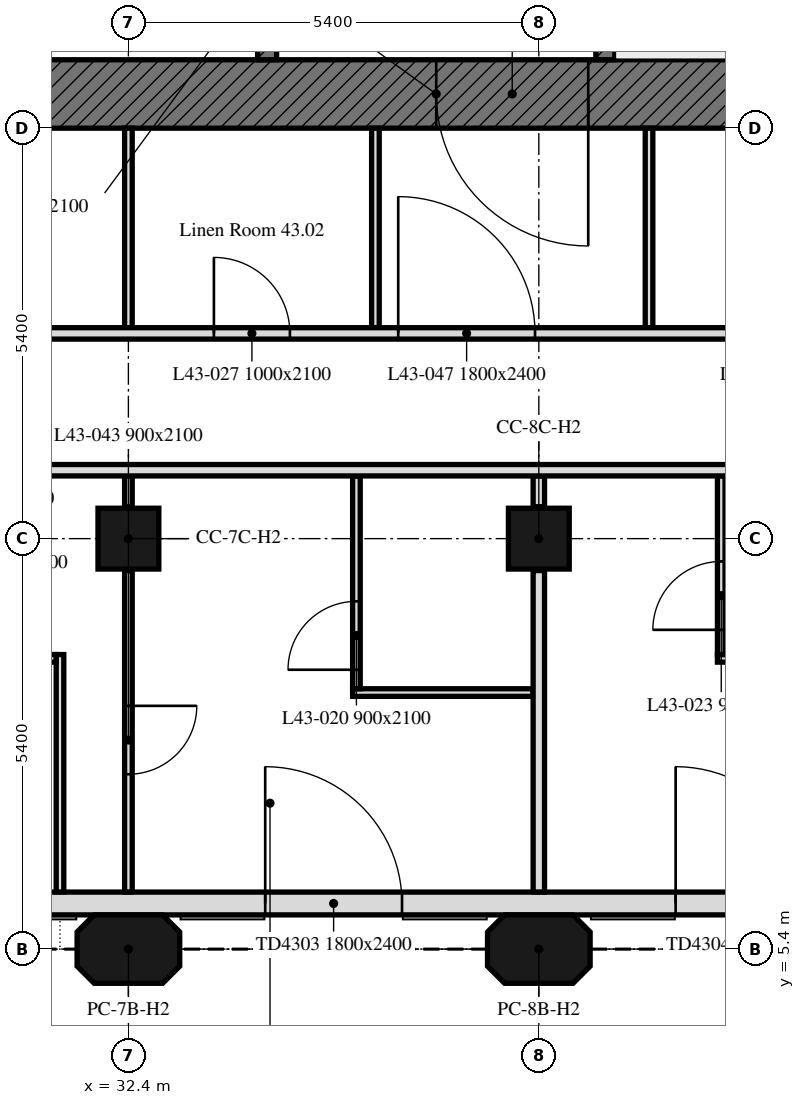
"""IFC4 building model, lengths in metres.
Left out: names, types, materials, properties, quantities, classifications, styles, units other than length and angle.
Written with IfcOpenShell. Run it as: python <this file> out.ifc"""

import sys

from ifc_helpers import new_model, si_unit, direction, frame, frame_2d, origin, origin_2d, place, context, subcontext, project, spatial, polyline, rectangle, outline, extrude, element, fill, save


model = new_model("IFC4")
c1 = context("Model", 3, precision=1e-05, world=origin(), true_north=direction((0.0, 1.0)))
c2 = subcontext(c1, "Body", "Model", "MODEL_VIEW")
j1 = project(units=[si_unit("LENGTHUNIT", "METRE"), si_unit("PLANEANGLEUNIT", "RADIAN")], contexts=[c1])
p1 = place(None, origin())
s1 = spatial("IfcSite", under=j1, at=p1, CompositionType="ELEMENT")
p2 = place(p1, origin())
s2 = spatial("IfcBuilding", under=s1, at=p2, CompositionType="ELEMENT")
p3 = place(p2, frame((0.0, 0.0, 180.7)))
s3 = spatial("IfcBuildingStorey", under=s2, at=p3, CompositionType="ELEMENT", Elevation=180.7)
for number, where, z_axis, x_axis in (
    (1, (32.4, 5.4, 0.0), (0.0, 0.0, 1.0), (1.0, 0.0, 0.0)),
    (2, (37.8, 5.4, 0.0), (0.0, 0.0, 1.0), (1.0, 0.0, 0.0)),
):
    element("IfcColumn", number, at=place(p3, frame(where, z_axis=z_axis, x_axis=x_axis)), inside=s3, PredefinedType="COLUMN", context=c2, shape_type="SweptSolid", body=[
        extrude(outline(polyline([(-0.45, -0.45), (0.45, -0.45), (0.675, -0.225), (0.675, 0.225), (0.45, 0.45), (-0.45, 0.45), (-0.675, 0.225), (-0.675, -0.225), (-0.45, -0.45)])), origin(), (0.0, 0.0, 1.0), 3.0),
    ])
for number, where, z_axis, x_axis in (
    (3, (32.4, 10.8, 0.0), (0.0, 0.0, 1.0), (1.0, 0.0, 0.0)),
    (4, (37.8, 10.8, 0.0), (0.0, 0.0, 1.0), (1.0, 0.0, 0.0)),
):
    element("IfcColumn", number, at=place(p3, frame(where, z_axis=z_axis, x_axis=x_axis)), inside=s3, PredefinedType="COLUMN", context=c2, shape_type="SweptSolid", body=[
        extrude(rectangle(XDim=0.8, YDim=0.8, at=origin_2d()), origin(), (0.0, 0.0, 1.0), 3.0),
    ])
p4 = place(p3, frame((10.986, 6.0, 0.0), z_axis=(0.0, 0.0, 1.0), x_axis=(1.0, 0.0, 0.0)))
e5 = element("IfcWall", 5, at=p4, inside=s3, PredefinedType="SOLIDWALL", context=c2, shape_type="SweptSolid", body=[
    extrude(rectangle(XDim=32.027, YDim=0.3, at=frame_2d((16.014, 0.0))), origin(), (0.0, 0.0, 1.0), 3.0),
])
p5 = place(p4, frame((1.614, 0.0, 0.0)))
e6 = element("IfcOpeningElement", 6, at=p5, cuts=e5, PredefinedType="OPENING", context=c2, shape_type="SweptSolid", body=[
    extrude(rectangle(XDim=1.8, YDim=2.4, at=frame_2d((0.9, 1.2))), frame((0.0, 0.16, 0.0), z_axis=(0.0, -1.0, 0.0), x_axis=(1.0, 0.0, 0.0)), (0.0, 0.0, 1.0), 0.32),
])
p6 = place(p4, frame((12.414, 0.0, 0.0)))
e7 = element("IfcOpeningElement", 7, at=p6, cuts=e5, PredefinedType="OPENING", context=c2, shape_type="SweptSolid", body=[
    extrude(rectangle(XDim=1.8, YDim=2.4, at=frame_2d((0.9, 1.2))), frame((0.0, 0.16, 0.0), z_axis=(0.0, -1.0, 0.0), x_axis=(1.0, 0.0, 0.0)), (0.0, 0.0, 1.0), 0.32),
])
p7 = place(p4, frame((23.214, 0.0, 0.0)))
e8 = element("IfcOpeningElement", 8, at=p7, cuts=e5, PredefinedType="OPENING", context=c2, shape_type="SweptSolid", body=[
    extrude(rectangle(XDim=1.8, YDim=2.4, at=frame_2d((0.9, 1.2))), frame((0.0, 0.16, 0.0), z_axis=(0.0, -1.0, 0.0), x_axis=(1.0, 0.0, 0.0)), (0.0, 0.0, 1.0), 0.32),
])
p8 = place(p4, frame((28.614, 0.0, 0.0)))
e9 = element("IfcOpeningElement", 9, at=p8, cuts=e5, PredefinedType="OPENING", context=c2, shape_type="SweptSolid", body=[
    extrude(rectangle(XDim=1.8, YDim=2.4, at=frame_2d((0.9, 1.2))), frame((0.0, 0.16, 0.0), z_axis=(0.0, -1.0, 0.0), x_axis=(1.0, 0.0, 0.0)), (0.0, 0.0, 1.0), 0.32),
])
p9 = place(p4, frame((7.464, 0.0, 0.9)))
e10 = element("IfcOpeningElement", 10, at=p9, cuts=e5, PredefinedType="OPENING", context=c2, shape_type="SweptSolid", body=[
    extrude(rectangle(XDim=1.1, YDim=1.7, at=frame_2d((0.55, 0.85))), frame((0.0, 0.16, 0.0), z_axis=(0.0, -1.0, 0.0), x_axis=(1.0, 0.0, 0.0)), (0.0, 0.0, 1.0), 0.32),
])
p10 = place(p4, frame((18.264, 0.0, 0.9)))
e11 = element("IfcOpeningElement", 11, at=p10, cuts=e5, PredefinedType="OPENING", context=c2, shape_type="SweptSolid", body=[
    extrude(rectangle(XDim=1.1, YDim=1.7, at=frame_2d((0.55, 0.85))), frame((0.0, 0.16, 0.0), z_axis=(0.0, -1.0, 0.0), x_axis=(1.0, 0.0, 0.0)), (0.0, 0.0, 1.0), 0.32),
])
p11 = place(p3, frame((42.0, 16.65, 0.0), z_axis=(0.0, 0.0, 1.0), x_axis=(-1.0, 0.0, 0.0)))
e12 = element("IfcWall", 12, at=p11, inside=s3, PredefinedType="SOLIDWALL", context=c2, shape_type="SweptSolid", body=[
    extrude(rectangle(XDim=11.1, YDim=0.9, at=frame_2d((5.55, 0.0))), origin(), (0.0, 0.0, 1.0), 3.0),
])
p12 = place(p11, frame((3.55, 0.0, 0.0)))
e13 = element("IfcOpeningElement", 13, at=p12, cuts=e12, PredefinedType="OPENING", context=c2, shape_type="SweptSolid", body=[
    extrude(rectangle(XDim=2.0, YDim=2.4, at=frame_2d((1.0, 1.2))), frame((0.0, 0.45, 0.0), z_axis=(0.0, -1.0, 0.0), x_axis=(1.0, 0.0, 0.0)), (0.0, 0.0, 1.0), 0.9),
])
p13 = place(p3, frame((38.675, 17.1, 0.0), z_axis=(0.0, 0.0, 1.0), x_axis=(0.0, 1.0, 0.0)))
e14 = element("IfcWall", 14, at=p13, inside=s3, PredefinedType="SOLIDWALL", context=c2, shape_type="SweptSolid", body=[
    extrude(rectangle(XDim=14.4, YDim=0.25, at=frame_2d((7.2, 0.0))), origin(), (0.0, 0.0, 1.0), 3.0),
])
p14 = place(p13, frame((4.6, 0.0, 0.0)))
e15 = element("IfcOpeningElement", 15, at=p14, cuts=e14, PredefinedType="OPENING", context=c2, shape_type="SweptSolid", body=[
    extrude(rectangle(XDim=1.0, YDim=2.1, at=frame_2d((0.5, 1.05))), frame((0.0, 0.125, 0.0), z_axis=(0.0, -1.0, 0.0), x_axis=(1.0, 0.0, 0.0)), (0.0, 0.0, 1.0), 0.25),
])
p15 = place(p13, frame((7.062, 0.0, 0.0)))
e16 = element("IfcOpeningElement", 16, at=p15, cuts=e14, PredefinedType="OPENING", context=c2, shape_type="SweptSolid", body=[
    extrude(rectangle(XDim=1.2, YDim=2.1, at=frame_2d((0.6, 1.05))), frame((0.0, 0.125, 0.0), z_axis=(0.0, -1.0, 0.0), x_axis=(1.0, 0.0, 0.0)), (0.0, 0.0, 1.0), 0.25),
])
p16 = place(p13, frame((9.472, 0.0, 0.0)))
e17 = element("IfcOpeningElement", 17, at=p16, cuts=e14, PredefinedType="OPENING", context=c2, shape_type="SweptSolid", body=[
    extrude(rectangle(XDim=0.9, YDim=2.1, at=frame_2d((0.45, 1.05))), frame((0.0, 0.125, 0.0), z_axis=(0.0, -1.0, 0.0), x_axis=(1.0, 0.0, 0.0)), (0.0, 0.0, 1.0), 0.25),
])
p17 = place(p13, frame((10.779, 0.0, 0.0)))
e18 = element("IfcOpeningElement", 18, at=p17, cuts=e14, PredefinedType="OPENING", context=c2, shape_type="SweptSolid", body=[
    extrude(rectangle(XDim=0.9, YDim=2.1, at=frame_2d((0.45, 1.05))), frame((0.0, 0.125, 0.0), z_axis=(0.0, -1.0, 0.0), x_axis=(1.0, 0.0, 0.0)), (0.0, 0.0, 1.0), 0.25),
])
p18 = place(p13, frame((12.048, 0.0, 0.0)))
e19 = element("IfcOpeningElement", 19, at=p18, cuts=e14, PredefinedType="OPENING", context=c2, shape_type="SweptSolid", body=[
    extrude(rectangle(XDim=0.9, YDim=2.1, at=frame_2d((0.45, 1.05))), frame((0.0, 0.125, 0.0), z_axis=(0.0, -1.0, 0.0), x_axis=(1.0, 0.0, 0.0)), (0.0, 0.0, 1.0), 0.25),
])
p19 = place(p13, frame((13.354, 0.0, 0.0)))
e20 = element("IfcOpeningElement", 20, at=p19, cuts=e14, PredefinedType="OPENING", context=c2, shape_type="SweptSolid", body=[
    extrude(rectangle(XDim=0.9, YDim=2.1, at=frame_2d((0.45, 1.05))), frame((0.0, 0.125, 0.0), z_axis=(0.0, -1.0, 0.0), x_axis=(1.0, 0.0, 0.0)), (0.0, 0.0, 1.0), 0.25),
])
p20 = place(p3, frame((34.225, 17.1, 0.0), z_axis=(0.0, 0.0, 1.0), x_axis=(0.0, 1.0, 0.0)))
e21 = element("IfcWall", 21, at=p20, inside=s3, PredefinedType="SOLIDWALL", context=c2, shape_type="SweptSolid", body=[
    extrude(rectangle(XDim=14.4, YDim=0.25, at=frame_2d((7.2, 0.0))), origin(), (0.0, 0.0, 1.0), 3.0),
])
p21 = place(p20, frame((13.15, 0.0, 0.0)))
e22 = element("IfcOpeningElement", 22, at=p21, cuts=e21, PredefinedType="OPENING", context=c2, shape_type="SweptSolid", body=[
    extrude(rectangle(XDim=1.0, YDim=2.1, at=frame_2d((0.5, 1.05))), frame((0.0, 0.125, 0.0), z_axis=(0.0, -1.0, 0.0), x_axis=(1.0, 0.0, 0.0)), (0.0, 0.0, 1.0), 0.25),
])
p22 = place(p20, frame((0.6, 0.0, 0.0)))
e23 = element("IfcOpeningElement", 23, at=p22, cuts=e21, PredefinedType="OPENING", context=c2, shape_type="SweptSolid", body=[
    extrude(rectangle(XDim=1.1, YDim=2.1, at=frame_2d((0.55, 1.05))), frame((0.0, 0.125, 0.0), z_axis=(0.0, -1.0, 0.0), x_axis=(1.0, 0.0, 0.0)), (0.0, 0.0, 1.0), 0.25),
])
p23 = place(p20, frame((3.25, 0.0, 0.0)))
e24 = element("IfcOpeningElement", 24, at=p23, cuts=e21, PredefinedType="OPENING", context=c2, shape_type="SweptSolid", body=[
    extrude(rectangle(XDim=0.9, YDim=2.1, at=frame_2d((0.45, 1.05))), frame((0.0, 0.125, 0.0), z_axis=(0.0, -1.0, 0.0), x_axis=(1.0, 0.0, 0.0)), (0.0, 0.0, 1.0), 0.25),
])
p24 = place(p3, frame((32.4, 11.625, 0.0), z_axis=(0.0, 0.0, 1.0), x_axis=(0.0, -1.0, 0.0)))
e25 = element("IfcWall", 25, at=p24, inside=s3, PredefinedType="PARTITIONING", context=c2, shape_type="SweptSolid", body=[
    extrude(rectangle(XDim=0.405, YDim=0.1, at=frame_2d((0.203, 0.0))), origin(), (0.0, 0.0, 1.0), 3.0),
])
p25 = place(p3, frame((32.4, 10.38, 0.0), z_axis=(0.0, 0.0, 1.0), x_axis=(0.0, -1.0, 0.0)))
e26 = element("IfcWall", 26, at=p25, inside=s3, PredefinedType="PARTITIONING", context=c2, shape_type="SweptSolid", body=[
    extrude(rectangle(XDim=4.229, YDim=0.1, at=frame_2d((2.115, 0.0))), origin(), (0.0, 0.0, 1.0), 3.0),
])
p26 = place(p25, frame((1.78, 0.0, 0.0)))
e27 = element("IfcOpeningElement", 27, at=p26, cuts=e26, PredefinedType="OPENING", context=c2, shape_type="SweptSolid", body=[
    extrude(rectangle(XDim=0.9, YDim=2.1, at=frame_2d((0.45, 1.05))), frame((0.0, 0.05, 0.0), z_axis=(0.0, -1.0, 0.0), x_axis=(1.0, 0.0, 0.0)), (0.0, 0.0, 1.0), 0.1),
])
p27 = place(p3, frame((37.725, 8.775, 0.0), z_axis=(0.0, 0.0, 1.0), x_axis=(-1.0, 0.0, 0.0)))
e28 = element("IfcWall", 28, at=p27, inside=s3, PredefinedType="PARTITIONING", context=c2, shape_type="SweptSolid", body=[
    extrude(rectangle(XDim=2.375, YDim=0.1, at=frame_2d((1.188, 0.0))), origin(), (0.0, 0.0, 1.0), 3.0),
])
p28 = place(p3, frame((35.4, 8.825, 0.0), z_axis=(0.0, 0.0, 1.0), x_axis=(0.0, 1.0, 0.0)))
e29 = element("IfcWall", 29, at=p28, inside=s3, PredefinedType="PARTITIONING", context=c2, shape_type="SweptSolid", body=[
    extrude(rectangle(XDim=2.8, YDim=0.1, at=frame_2d((1.4, 0.0))), origin(), (0.0, 0.0, 1.0), 3.0),
])
p29 = place(p28, frame((0.25, 0.0, 0.0)))
e30 = element("IfcOpeningElement", 30, at=p29, cuts=e29, PredefinedType="OPENING", context=c2, shape_type="SweptSolid", body=[
    extrude(rectangle(XDim=0.9, YDim=2.1, at=frame_2d((0.45, 1.05))), frame((0.0, 0.05, 0.0), z_axis=(0.0, -1.0, 0.0), x_axis=(1.0, 0.0, 0.0)), (0.0, 0.0, 1.0), 0.1),
])
p30 = place(p3, frame((31.5, 9.275, 0.0), z_axis=(0.0, 0.0, 1.0), x_axis=(0.0, -1.0, 0.0)))
e31 = element("IfcWall", 31, at=p30, inside=s3, PredefinedType="PARTITIONING", context=c2, shape_type="SweptSolid", body=[
    extrude(rectangle(XDim=3.124, YDim=0.1, at=frame_2d((1.562, 0.0))), origin(), (0.0, 0.0, 1.0), 3.0),
])
p31 = place(p3, frame((29.15, 9.225, 0.0), z_axis=(0.0, 0.0, 1.0), x_axis=(1.0, 0.0, 0.0)))
e32 = element("IfcWall", 32, at=p31, inside=s3, PredefinedType="PARTITIONING", context=c2, shape_type="SweptSolid", body=[
    extrude(rectangle(XDim=2.3, YDim=0.1, at=frame_2d((1.15, 0.0))), origin(), (0.0, 0.0, 1.0), 3.0),
])
p32 = place(p31, frame((0.3, 0.0, 0.0)))
e33 = element("IfcOpeningElement", 33, at=p32, cuts=e32, PredefinedType="OPENING", context=c2, shape_type="SweptSolid", body=[
    extrude(rectangle(XDim=0.9, YDim=2.1, at=frame_2d((0.45, 1.05))), frame((0.0, 0.05, 0.0), z_axis=(0.0, -1.0, 0.0), x_axis=(1.0, 0.0, 0.0)), (0.0, 0.0, 1.0), 0.1),
])
p33 = place(p3, frame((37.8, 6.151, 0.0), z_axis=(0.0, 0.0, 1.0), x_axis=(0.0, 1.0, 0.0)))
e34 = element("IfcWall", 34, at=p33, inside=s3, PredefinedType="PARTITIONING", context=c2, shape_type="SweptSolid", body=[
    extrude(rectangle(XDim=4.229, YDim=0.15, at=frame_2d((2.115, 0.0))), origin(), (0.0, 0.0, 1.0), 3.0),
])
p34 = place(p3, frame((37.8, 11.22, 0.0), z_axis=(0.0, 0.0, 1.0), x_axis=(0.0, 1.0, 0.0)))
e35 = element("IfcWall", 35, at=p34, inside=s3, PredefinedType="PARTITIONING", context=c2, shape_type="SweptSolid", body=[
    extrude(rectangle(XDim=0.405, YDim=0.15, at=frame_2d((0.203, 0.0))), origin(), (0.0, 0.0, 1.0), 3.0),
])
p35 = place(p3, frame((42.55, 9.225, 0.0), z_axis=(0.0, 0.0, 1.0), x_axis=(-1.0, 0.0, 0.0)))
e36 = element("IfcWall", 36, at=p35, inside=s3, PredefinedType="PARTITIONING", context=c2, shape_type="SweptSolid", body=[
    extrude(rectangle(XDim=2.4, YDim=0.1, at=frame_2d((1.2, 0.0))), origin(), (0.0, 0.0, 1.0), 3.0),
])
p36 = place(p3, frame((40.2, 9.275, 0.0), z_axis=(0.0, 0.0, 1.0), x_axis=(0.0, 1.0, 0.0)))
e37 = element("IfcWall", 37, at=p36, inside=s3, PredefinedType="PARTITIONING", context=c2, shape_type="SweptSolid", body=[
    extrude(rectangle(XDim=2.35, YDim=0.1, at=frame_2d((1.175, 0.0))), origin(), (0.0, 0.0, 1.0), 3.0),
])
p37 = place(p36, frame((0.325, 0.0, 0.0)))
e38 = element("IfcOpeningElement", 38, at=p37, cuts=e37, PredefinedType="OPENING", context=c2, shape_type="SweptSolid", body=[
    extrude(rectangle(XDim=0.9, YDim=2.1, at=frame_2d((0.45, 1.05))), frame((0.0, 0.05, 0.0), z_axis=(0.0, -1.0, 0.0), x_axis=(1.0, 0.0, 0.0)), (0.0, 0.0, 1.0), 0.1),
])
p38 = place(p3, frame((6.151, 11.7, 0.0), z_axis=(0.0, 0.0, 1.0), x_axis=(1.0, 0.0, 0.0)))
e39 = element("IfcWall", 39, at=p38, inside=s3, PredefinedType="PARTITIONING", context=c2, shape_type="SweptSolid", body=[
    extrude(rectangle(XDim=41.698, YDim=0.15, at=frame_2d((20.849, 0.0))), origin(), (0.0, 0.0, 1.0), 3.0),
])
p39 = place(p38, frame((1.449, 0.0, 0.0)))
e40 = element("IfcOpeningElement", 40, at=p39, cuts=e39, PredefinedType="OPENING", context=c2, shape_type="SweptSolid", body=[
    extrude(rectangle(XDim=1.0, YDim=2.1, at=frame_2d((0.5, 1.05))), frame((0.0, 0.075, 0.0), z_axis=(0.0, -1.0, 0.0), x_axis=(1.0, 0.0, 0.0)), (0.0, 0.0, 1.0), 0.15),
])
p40 = place(p38, frame((37.954, 0.0, 0.0)))
e41 = element("IfcOpeningElement", 41, at=p40, cuts=e39, PredefinedType="OPENING", context=c2, shape_type="SweptSolid", body=[
    extrude(rectangle(XDim=1.0, YDim=2.1, at=frame_2d((0.5, 1.05))), frame((0.0, 0.075, 0.0), z_axis=(0.0, -1.0, 0.0), x_axis=(1.0, 0.0, 0.0)), (0.0, 0.0, 1.0), 0.15),
])
p41 = place(p38, frame((12.449, 0.0, 0.0)))
e42 = element("IfcOpeningElement", 42, at=p41, cuts=e39, PredefinedType="OPENING", context=c2, shape_type="SweptSolid", body=[
    extrude(rectangle(XDim=1.0, YDim=2.1, at=frame_2d((0.5, 1.05))), frame((0.0, 0.075, 0.0), z_axis=(0.0, -1.0, 0.0), x_axis=(1.0, 0.0, 0.0)), (0.0, 0.0, 1.0), 0.15),
])
p42 = place(p38, frame((23.249, 0.0, 0.0)))
e43 = element("IfcOpeningElement", 43, at=p42, cuts=e39, PredefinedType="OPENING", context=c2, shape_type="SweptSolid", body=[
    extrude(rectangle(XDim=1.0, YDim=2.1, at=frame_2d((0.5, 1.05))), frame((0.0, 0.075, 0.0), z_axis=(0.0, -1.0, 0.0), x_axis=(1.0, 0.0, 0.0)), (0.0, 0.0, 1.0), 0.15),
])
for number, where, z_axis, x_axis in (
    (44, (32.4, 13.575, 0.0), (0.0, 0.0, 1.0), (0.0, 1.0, 0.0)),
    (45, (35.65, 16.2, 0.0), (0.0, 0.0, 1.0), (0.0, -1.0, 0.0)),
    (46, (39.25, 13.575, 0.0), (0.0, 0.0, 1.0), (0.0, 1.0, 0.0)),
):
    element("IfcWall", number, at=place(p3, frame(where, z_axis=z_axis, x_axis=x_axis)), inside=s3, PredefinedType="PARTITIONING", context=c2, shape_type="SweptSolid", body=[
        extrude(rectangle(XDim=2.625, YDim=0.1, at=frame_2d((1.312, 0.0))), origin(), (0.0, 0.0, 1.0), 3.0),
    ])
p43 = place(p3, frame((6.151, 13.5, 0.0), z_axis=(0.0, 0.0, 1.0), x_axis=(1.0, 0.0, 0.0)))
e47 = element("IfcWall", 47, at=p43, inside=s3, PredefinedType="PARTITIONING", context=c2, shape_type="SweptSolid", body=[
    extrude(rectangle(XDim=36.974, YDim=0.15, at=frame_2d((18.487, 0.0))), origin(), (0.0, 0.0, 1.0), 3.0),
])
p44 = place(p43, frame((17.649, 0.0, 0.0)))
e48 = element("IfcOpeningElement", 48, at=p44, cuts=e47, PredefinedType="OPENING", context=c2, shape_type="SweptSolid", body=[
    extrude(rectangle(XDim=1.0, YDim=2.1, at=frame_2d((0.5, 1.05))), frame((0.0, 0.075, 0.0), z_axis=(0.0, -1.0, 0.0), x_axis=(1.0, 0.0, 0.0)), (0.0, 0.0, 1.0), 0.15),
])
p45 = place(p43, frame((2.029, 0.0, 0.0)))
e49 = element("IfcOpeningElement", 49, at=p45, cuts=e47, PredefinedType="OPENING", context=c2, shape_type="SweptSolid", body=[
    extrude(rectangle(XDim=1.0, YDim=2.1, at=frame_2d((0.5, 1.05))), frame((0.0, 0.075, 0.0), z_axis=(0.0, -1.0, 0.0), x_axis=(1.0, 0.0, 0.0)), (0.0, 0.0, 1.0), 0.15),
])
p46 = place(p43, frame((27.374, 0.0, 0.0)))
e50 = element("IfcOpeningElement", 50, at=p46, cuts=e47, PredefinedType="OPENING", context=c2, shape_type="SweptSolid", body=[
    extrude(rectangle(XDim=1.0, YDim=2.1, at=frame_2d((0.5, 1.05))), frame((0.0, 0.075, 0.0), z_axis=(0.0, -1.0, 0.0), x_axis=(1.0, 0.0, 0.0)), (0.0, 0.0, 1.0), 0.15),
])
p47 = place(p43, frame((34.574, 0.0, 0.0)))
e51 = element("IfcOpeningElement", 51, at=p47, cuts=e47, PredefinedType="OPENING", context=c2, shape_type="SweptSolid", body=[
    extrude(rectangle(XDim=1.0, YDim=2.1, at=frame_2d((0.5, 1.05))), frame((0.0, 0.075, 0.0), z_axis=(0.0, -1.0, 0.0), x_axis=(1.0, 0.0, 0.0)), (0.0, 0.0, 1.0), 0.15),
])
p48 = place(p43, frame((7.924, 0.0, 0.0)))
e52 = element("IfcOpeningElement", 52, at=p48, cuts=e47, PredefinedType="OPENING", context=c2, shape_type="SweptSolid", body=[
    extrude(rectangle(XDim=1.0, YDim=2.1, at=frame_2d((0.5, 1.05))), frame((0.0, 0.075, 0.0), z_axis=(0.0, -1.0, 0.0), x_axis=(1.0, 0.0, 0.0)), (0.0, 0.0, 1.0), 0.15),
])
p49 = place(p43, frame((4.699, 0.0, 0.0)))
e53 = element("IfcOpeningElement", 53, at=p49, cuts=e47, PredefinedType="OPENING", context=c2, shape_type="SweptSolid", body=[
    extrude(rectangle(XDim=1.8, YDim=2.4, at=frame_2d((0.9, 1.2))), frame((0.0, 0.075, 0.0), z_axis=(0.0, -1.0, 0.0), x_axis=(1.0, 0.0, 0.0)), (0.0, 0.0, 1.0), 0.15),
])
p50 = place(p43, frame((29.799, 0.0, 0.0)))
e54 = element("IfcOpeningElement", 54, at=p50, cuts=e47, PredefinedType="OPENING", context=c2, shape_type="SweptSolid", body=[
    extrude(rectangle(XDim=1.8, YDim=2.4, at=frame_2d((0.9, 1.2))), frame((0.0, 0.075, 0.0), z_axis=(0.0, -1.0, 0.0), x_axis=(1.0, 0.0, 0.0)), (0.0, 0.0, 1.0), 0.15),
])
p51 = place(p7, origin())
e55 = element("IfcDoor", 55, at=p51, inside=s3, OperationType="DOUBLE_DOOR_DOUBLE_SWING", PredefinedType="DOOR", context=c2, shape_type="SweptSolid", body=[
    extrude(rectangle(XDim=1.8, YDim=2.4, at=frame_2d((0.9, 1.2))), frame((0.0, 0.025, 0.0), z_axis=(0.0, -1.0, 0.0), x_axis=(1.0, 0.0, 0.0)), (0.0, 0.0, 1.0), 0.05),
])
fill(e8, e55)
p52 = place(p8, origin())
e56 = element("IfcDoor", 56, at=p52, inside=s3, OperationType="DOUBLE_DOOR_DOUBLE_SWING", PredefinedType="DOOR", context=c2, shape_type="SweptSolid", body=[
    extrude(rectangle(XDim=1.8, YDim=2.4, at=frame_2d((0.9, 1.2))), frame((0.0, 0.025, 0.0), z_axis=(0.0, -1.0, 0.0), x_axis=(1.0, 0.0, 0.0)), (0.0, 0.0, 1.0), 0.05),
])
fill(e9, e56)
p53 = place(p12, origin())
e57 = element("IfcDoor", 57, at=p53, inside=s3, OperationType="DOUBLE_DOOR_SINGLE_SWING", PredefinedType="DOOR", context=c2, shape_type="SweptSolid", body=[
    extrude(rectangle(XDim=2.0, YDim=2.4, at=frame_2d((1.0, 1.2))), frame((0.0, 0.025, 0.0), z_axis=(0.0, -1.0, 0.0), x_axis=(1.0, 0.0, 0.0)), (0.0, 0.0, 1.0), 0.05),
])
fill(e13, e57)
p54 = place(p29, origin())
e58 = element("IfcDoor", 58, at=p54, inside=s3, OperationType="SINGLE_SWING_LEFT", PredefinedType="DOOR", context=c2, shape_type="SweptSolid", body=[
    extrude(rectangle(XDim=0.9, YDim=2.1, at=frame_2d((0.45, 1.05))), frame((0.0, 0.025, 0.0), z_axis=(0.0, -1.0, 0.0), x_axis=(1.0, 0.0, 0.0)), (0.0, 0.0, 1.0), 0.05),
])
fill(e30, e58)
p55 = place(p37, origin())
e59 = element("IfcDoor", 59, at=p55, inside=s3, OperationType="SINGLE_SWING_RIGHT", PredefinedType="DOOR", context=c2, shape_type="SweptSolid", body=[
    extrude(rectangle(XDim=0.9, YDim=2.1, at=frame_2d((0.45, 1.05))), frame((0.0, 0.025, 0.0), z_axis=(0.0, -1.0, 0.0), x_axis=(1.0, 0.0, 0.0)), (0.0, 0.0, 1.0), 0.05),
])
fill(e38, e59)
p56 = place(p46, origin())
e60 = element("IfcDoor", 60, at=p56, inside=s3, OperationType="SINGLE_SWING_LEFT", PredefinedType="DOOR", context=c2, shape_type="SweptSolid", body=[
    extrude(rectangle(XDim=1.0, YDim=2.1, at=frame_2d((0.5, 1.05))), frame((0.0, 0.025, 0.0), z_axis=(0.0, -1.0, 0.0), x_axis=(1.0, 0.0, 0.0)), (0.0, 0.0, 1.0), 0.05),
])
fill(e50, e60)
p57 = place(p26, origin())
e61 = element("IfcDoor", 61, at=p57, inside=s3, OperationType="SINGLE_SWING_RIGHT", PredefinedType="DOOR", context=c2, shape_type="SweptSolid", body=[
    extrude(rectangle(XDim=0.9, YDim=2.1, at=frame_2d((0.45, 1.05))), frame((0.0, 0.025, 0.0), z_axis=(0.0, -1.0, 0.0), x_axis=(1.0, 0.0, 0.0)), (0.0, 0.0, 1.0), 0.05),
])
fill(e27, e61)
p58 = place(p50, origin())
e62 = element("IfcDoor", 62, at=p58, inside=s3, OperationType="DOUBLE_DOOR_SINGLE_SWING", PredefinedType="DOOR", context=c2, shape_type="SweptSolid", body=[
    extrude(rectangle(XDim=1.8, YDim=2.4, at=frame_2d((0.9, 1.2))), frame((0.0, 0.025, 0.0), z_axis=(0.0, -1.0, 0.0), x_axis=(1.0, 0.0, 0.0)), (0.0, 0.0, 1.0), 0.05),
])
fill(e54, e62)
save(model, sys.argv[1])
